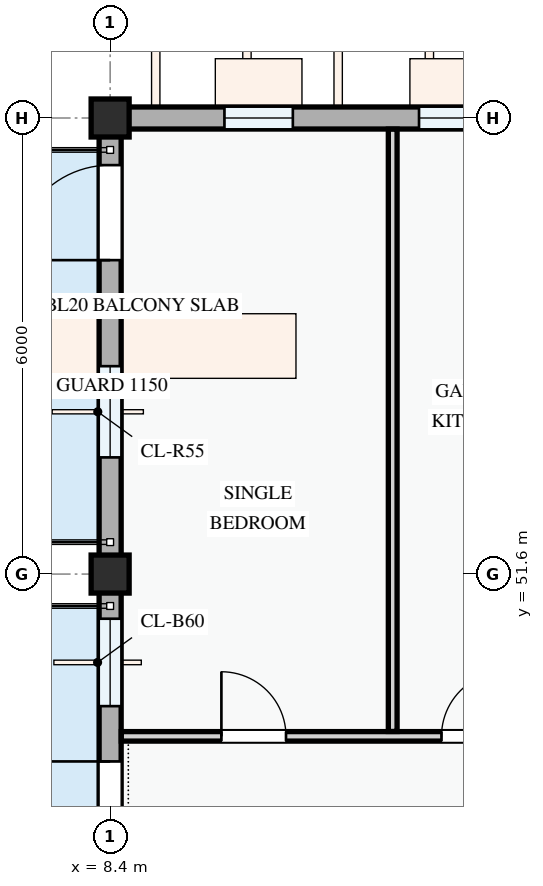
"""IFC4 building model, lengths in metres.
Left out: names, types, materials, properties, quantities, classifications, styles, units other than length and angle.
Written with IfcOpenShell. Run it as: python <this file> out.ifc"""

import sys

from ifc_helpers import new_model, si_unit, direction, frame, frame_2d, origin, origin_2d, place, context, subcontext, project, spatial, rectangle, extrude, element, fill, save


model = new_model("IFC4")
c1 = context("Model", 3, precision=1e-05, world=origin(), true_north=direction((0.0, 1.0)))
c2 = subcontext(c1, "Body", "Model", "MODEL_VIEW")
j1 = project(units=[si_unit("LENGTHUNIT", "METRE"), si_unit("PLANEANGLEUNIT", "RADIAN")], contexts=[c1])
p1 = place(None, origin())
s1 = spatial("IfcSite", under=j1, at=p1, CompositionType="ELEMENT")
p2 = place(p1, origin())
s2 = spatial("IfcBuilding", under=s1, at=p2, CompositionType="ELEMENT")
p3 = place(p2, frame((0.0, 0.0, 21.3)))
s3 = spatial("IfcBuildingStorey", under=s2, at=p3, CompositionType="ELEMENT", Elevation=21.3)
for number, where, z_axis, x_axis in (
    (1, (8.4, 51.6, 0.0), (0.0, 0.0, 1.0), (1.0, 0.0, 0.0)),
    (2, (8.4, 57.6, 0.0), (0.0, 0.0, 1.0), (1.0, 0.0, 0.0)),
):
    element("IfcColumn", number, at=place(p3, frame(where, z_axis=z_axis, x_axis=x_axis)), inside=s3, PredefinedType="COLUMN", context=c2, shape_type="SweptSolid", body=[
        extrude(rectangle(XDim=0.5, YDim=0.5, at=origin_2d()), origin(), (0.0, 0.0, 1.0), 3.3),
    ])
p4 = place(p3, frame((14.4, 57.6, 0.0), z_axis=(0.0, 0.0, 1.0), x_axis=(-1.0, 0.0, 0.0)))
e3 = element("IfcWall", 3, at=p4, inside=s3, PredefinedType="STANDARD", context=c2, shape_type="SweptSolid", body=[
    extrude(rectangle(XDim=6.0, YDim=0.29, at=frame_2d((3.0, 0.0))), origin(), (0.0, 0.0, 1.0), 2.475),
])
p5 = place(p4, frame((0.536, 0.0, 0.78)))
e4 = element("IfcOpeningElement", 4, at=p5, cuts=e3, PredefinedType="OPENING", context=c2, shape_type="SweptSolid", body=[
    extrude(rectangle(XDim=1.4, YDim=1.45, at=frame_2d((0.7, 0.725))), frame((0.0, 0.155, 0.0), z_axis=(0.0, -1.0, 0.0), x_axis=(1.0, 0.0, 0.0)), (0.0, 0.0, 1.0), 0.31),
])
p6 = place(p4, frame((3.596, 0.0, 0.78)))
e5 = element("IfcOpeningElement", 5, at=p6, cuts=e3, PredefinedType="OPENING", context=c2, shape_type="SweptSolid", body=[
    extrude(rectangle(XDim=0.9, YDim=1.2, at=frame_2d((0.45, 0.6))), frame((0.0, 0.155, 0.0), z_axis=(0.0, -1.0, 0.0), x_axis=(1.0, 0.0, 0.0)), (0.0, 0.0, 1.0), 0.31),
])
p7 = place(p3, frame((8.4, 57.6, 0.0), z_axis=(0.0, 0.0, 1.0), x_axis=(0.0, -1.0, 0.0)))
e6 = element("IfcWall", 6, at=p7, inside=s3, PredefinedType="STANDARD", context=c2, shape_type="SweptSolid", body=[
    extrude(rectangle(XDim=6.0, YDim=0.29, at=frame_2d((3.0, 0.0))), origin(), (0.0, 0.0, 1.0), 2.445),
])
p8 = place(p7, frame((0.62, 0.0, 0.0)))
e7 = element("IfcOpeningElement", 7, at=p8, cuts=e6, PredefinedType="OPENING", context=c2, shape_type="SweptSolid", body=[
    extrude(rectangle(XDim=1.25, YDim=2.2, at=frame_2d((0.625, 1.1))), frame((0.0, 0.155, 0.0), z_axis=(0.0, -1.0, 0.0), x_axis=(1.0, 0.0, 0.0)), (0.0, 0.0, 1.0), 0.31),
])
p9 = place(p7, frame((3.265, 0.0, 0.78)))
e8 = element("IfcOpeningElement", 8, at=p9, cuts=e6, PredefinedType="OPENING", context=c2, shape_type="SweptSolid", body=[
    extrude(rectangle(XDim=1.2, YDim=1.35, at=frame_2d((0.6, 0.675))), frame((0.0, 0.155, 0.0), z_axis=(0.0, -1.0, 0.0), x_axis=(1.0, 0.0, 0.0)), (0.0, 0.0, 1.0), 0.31),
])
p10 = place(p3, frame((8.4, 51.6, 0.0), z_axis=(0.0, 0.0, 1.0), x_axis=(0.0, -1.0, 0.0)))
e9 = element("IfcWall", 9, at=p10, inside=s3, PredefinedType="STANDARD", context=c2, shape_type="SweptSolid", body=[
    extrude(rectangle(XDim=8.4, YDim=0.29, at=frame_2d((4.2, 0.0))), origin(), (0.0, 0.0, 1.0), 2.345),
])
p11 = place(p10, frame((2.465, 0.0, 0.0)))
e10 = element("IfcOpeningElement", 10, at=p11, cuts=e9, PredefinedType="OPENING", context=c2, shape_type="SweptSolid", body=[
    extrude(rectangle(XDim=1.3, YDim=2.15, at=frame_2d((0.65, 1.075))), frame((0.0, 0.155, 0.0), z_axis=(0.0, -1.0, 0.0), x_axis=(1.0, 0.0, 0.0)), (0.0, 0.0, 1.0), 0.31),
])
p12 = place(p10, frame((0.587, 0.0, 0.78)))
e11 = element("IfcOpeningElement", 11, at=p12, cuts=e9, PredefinedType="OPENING", context=c2, shape_type="SweptSolid", body=[
    extrude(rectangle(XDim=1.15, YDim=1.25, at=frame_2d((0.575, 0.625))), frame((0.0, 0.155, 0.0), z_axis=(0.0, -1.0, 0.0), x_axis=(1.0, 0.0, 0.0)), (0.0, 0.0, 1.0), 0.31),
])
p13 = place(p10, frame((5.363, 0.0, 0.78)))
e12 = element("IfcOpeningElement", 12, at=p13, cuts=e9, PredefinedType="OPENING", context=c2, shape_type="SweptSolid", body=[
    extrude(rectangle(XDim=1.3, YDim=1.4, at=frame_2d((0.65, 0.7))), frame((0.0, 0.155, 0.0), z_axis=(0.0, -1.0, 0.0), x_axis=(1.0, 0.0, 0.0)), (0.0, 0.0, 1.0), 0.31),
])
p14 = place(p3, frame((8.547, 49.465, 0.0), z_axis=(0.0, 0.0, 1.0), x_axis=(1.0, 0.0, 0.0)))
e13 = element("IfcWall", 13, at=p14, inside=s3, PredefinedType="PARTITIONING", context=c2, shape_type="SweptSolid", body=[
    extrude(rectangle(XDim=7.456, YDim=0.125, at=frame_2d((3.728, 0.0))), origin(), (0.0, 0.0, 1.0), 3.0),
])
p15 = place(p14, frame((1.317, 0.0, 0.0)))
e14 = element("IfcOpeningElement", 14, at=p15, cuts=e13, PredefinedType="OPENING", context=c2, shape_type="SweptSolid", body=[
    extrude(rectangle(XDim=0.85, YDim=2.1, at=frame_2d((0.425, 1.05))), frame((0.0, 0.073, 0.0), z_axis=(0.0, -1.0, 0.0), x_axis=(1.0, 0.0, 0.0)), (0.0, 0.0, 1.0), 0.145),
])
p16 = place(p14, frame((4.212, 0.0, 0.0)))
e15 = element("IfcOpeningElement", 15, at=p16, cuts=e13, PredefinedType="OPENING", context=c2, shape_type="SweptSolid", body=[
    extrude(rectangle(XDim=0.85, YDim=2.1, at=frame_2d((0.425, 1.05))), frame((0.0, 0.073, 0.0), z_axis=(0.0, -1.0, 0.0), x_axis=(1.0, 0.0, 0.0)), (0.0, 0.0, 1.0), 0.145),
])
p17 = place(p14, frame((6.219, 0.0, 0.0)))
e16 = element("IfcOpeningElement", 16, at=p17, cuts=e13, PredefinedType="OPENING", context=c2, shape_type="SweptSolid", body=[
    extrude(rectangle(XDim=0.8, YDim=2.1, at=frame_2d((0.4, 1.05))), frame((0.0, 0.073, 0.0), z_axis=(0.0, -1.0, 0.0), x_axis=(1.0, 0.0, 0.0)), (0.0, 0.0, 1.0), 0.145),
])
p18 = place(p3, frame((12.118, 49.53, 0.0), z_axis=(0.0, 0.0, 1.0), x_axis=(0.0, 1.0, 0.0)))
e17 = element("IfcWall", 17, at=p18, inside=s3, PredefinedType="PARTITIONING", context=c2, shape_type="SweptSolid", body=[
    extrude(rectangle(XDim=7.923, YDim=0.115, at=frame_2d((3.962, 0.0))), origin(), (0.0, 0.0, 1.0), 3.0),
])
p19 = place(p5, origin())
e18 = element("IfcWindow", 18, at=p19, inside=s3, PartitioningType="SINGLE_PANEL", PredefinedType="WINDOW", context=c2, shape_type="SweptSolid", body=[
    extrude(rectangle(XDim=1.4, YDim=1.45, at=frame_2d((0.7, 0.725))), frame((0.0, 0.03, 0.0), z_axis=(0.0, -1.0, 0.0), x_axis=(1.0, 0.0, 0.0)), (0.0, 0.0, 1.0), 0.06),
])
fill(e4, e18)
p20 = place(p6, origin())
e19 = element("IfcWindow", 19, at=p20, inside=s3, PartitioningType="SINGLE_PANEL", PredefinedType="WINDOW", context=c2, shape_type="SweptSolid", body=[
    extrude(rectangle(XDim=0.9, YDim=1.2, at=frame_2d((0.45, 0.6))), frame((0.0, 0.03, 0.0), z_axis=(0.0, -1.0, 0.0), x_axis=(1.0, 0.0, 0.0)), (0.0, 0.0, 1.0), 0.06),
])
fill(e5, e19)
p21 = place(p8, frame((1.25, 0.0, 0.0), z_axis=(0.0, 0.0, 1.0), x_axis=(-1.0, 0.0, 0.0)))
e20 = element("IfcDoor", 20, at=p21, inside=s3, OperationType="SINGLE_SWING_LEFT", PredefinedType="DOOR", context=c2, shape_type="SweptSolid", body=[
    extrude(rectangle(XDim=1.25, YDim=2.2, at=frame_2d((0.625, 1.1))), frame((0.0, 0.025, 0.0), z_axis=(0.0, -1.0, 0.0), x_axis=(1.0, 0.0, 0.0)), (0.0, 0.0, 1.0), 0.05),
])
fill(e7, e20)
p22 = place(p9, origin())
e21 = element("IfcWindow", 21, at=p22, inside=s3, PartitioningType="SINGLE_PANEL", PredefinedType="WINDOW", context=c2, shape_type="SweptSolid", body=[
    extrude(rectangle(XDim=1.2, YDim=1.35, at=frame_2d((0.6, 0.675))), frame((0.0, 0.03, 0.0), z_axis=(0.0, -1.0, 0.0), x_axis=(1.0, 0.0, 0.0)), (0.0, 0.0, 1.0), 0.06),
])
fill(e8, e21)
p23 = place(p11, frame((1.3, 0.0, 0.0), z_axis=(0.0, 0.0, 1.0), x_axis=(-1.0, 0.0, 0.0)))
e22 = element("IfcDoor", 22, at=p23, inside=s3, OperationType="SINGLE_SWING_RIGHT", PredefinedType="DOOR", context=c2, shape_type="SweptSolid", body=[
    extrude(rectangle(XDim=1.3, YDim=2.15, at=frame_2d((0.65, 1.075))), frame((0.0, 0.025, 0.0), z_axis=(0.0, -1.0, 0.0), x_axis=(1.0, 0.0, 0.0)), (0.0, 0.0, 1.0), 0.05),
])
fill(e10, e22)
p24 = place(p12, origin())
e23 = element("IfcWindow", 23, at=p24, inside=s3, PartitioningType="SINGLE_PANEL", PredefinedType="WINDOW", context=c2, shape_type="SweptSolid", body=[
    extrude(rectangle(XDim=1.15, YDim=1.25, at=frame_2d((0.575, 0.625))), frame((0.0, 0.03, 0.0), z_axis=(0.0, -1.0, 0.0), x_axis=(1.0, 0.0, 0.0)), (0.0, 0.0, 1.0), 0.06),
])
fill(e11, e23)
p25 = place(p15, origin())
e24 = element("IfcDoor", 24, at=p25, inside=s3, OperationType="SINGLE_SWING_LEFT", PredefinedType="DOOR", context=c2, shape_type="SweptSolid", body=[
    extrude(rectangle(XDim=0.85, YDim=2.1, at=frame_2d((0.425, 1.05))), frame((0.0, 0.025, 0.0), z_axis=(0.0, -1.0, 0.0), x_axis=(1.0, 0.0, 0.0)), (0.0, 0.0, 1.0), 0.05),
])
fill(e14, e24)
p26 = place(p16, origin())
e25 = element("IfcDoor", 25, at=p26, inside=s3, OperationType="SINGLE_SWING_RIGHT", PredefinedType="DOOR", context=c2, shape_type="SweptSolid", body=[
    extrude(rectangle(XDim=0.85, YDim=2.1, at=frame_2d((0.425, 1.05))), frame((0.0, 0.025, 0.0), z_axis=(0.0, -1.0, 0.0), x_axis=(1.0, 0.0, 0.0)), (0.0, 0.0, 1.0), 0.05),
])
fill(e15, e25)
save(model, sys.argv[1])
